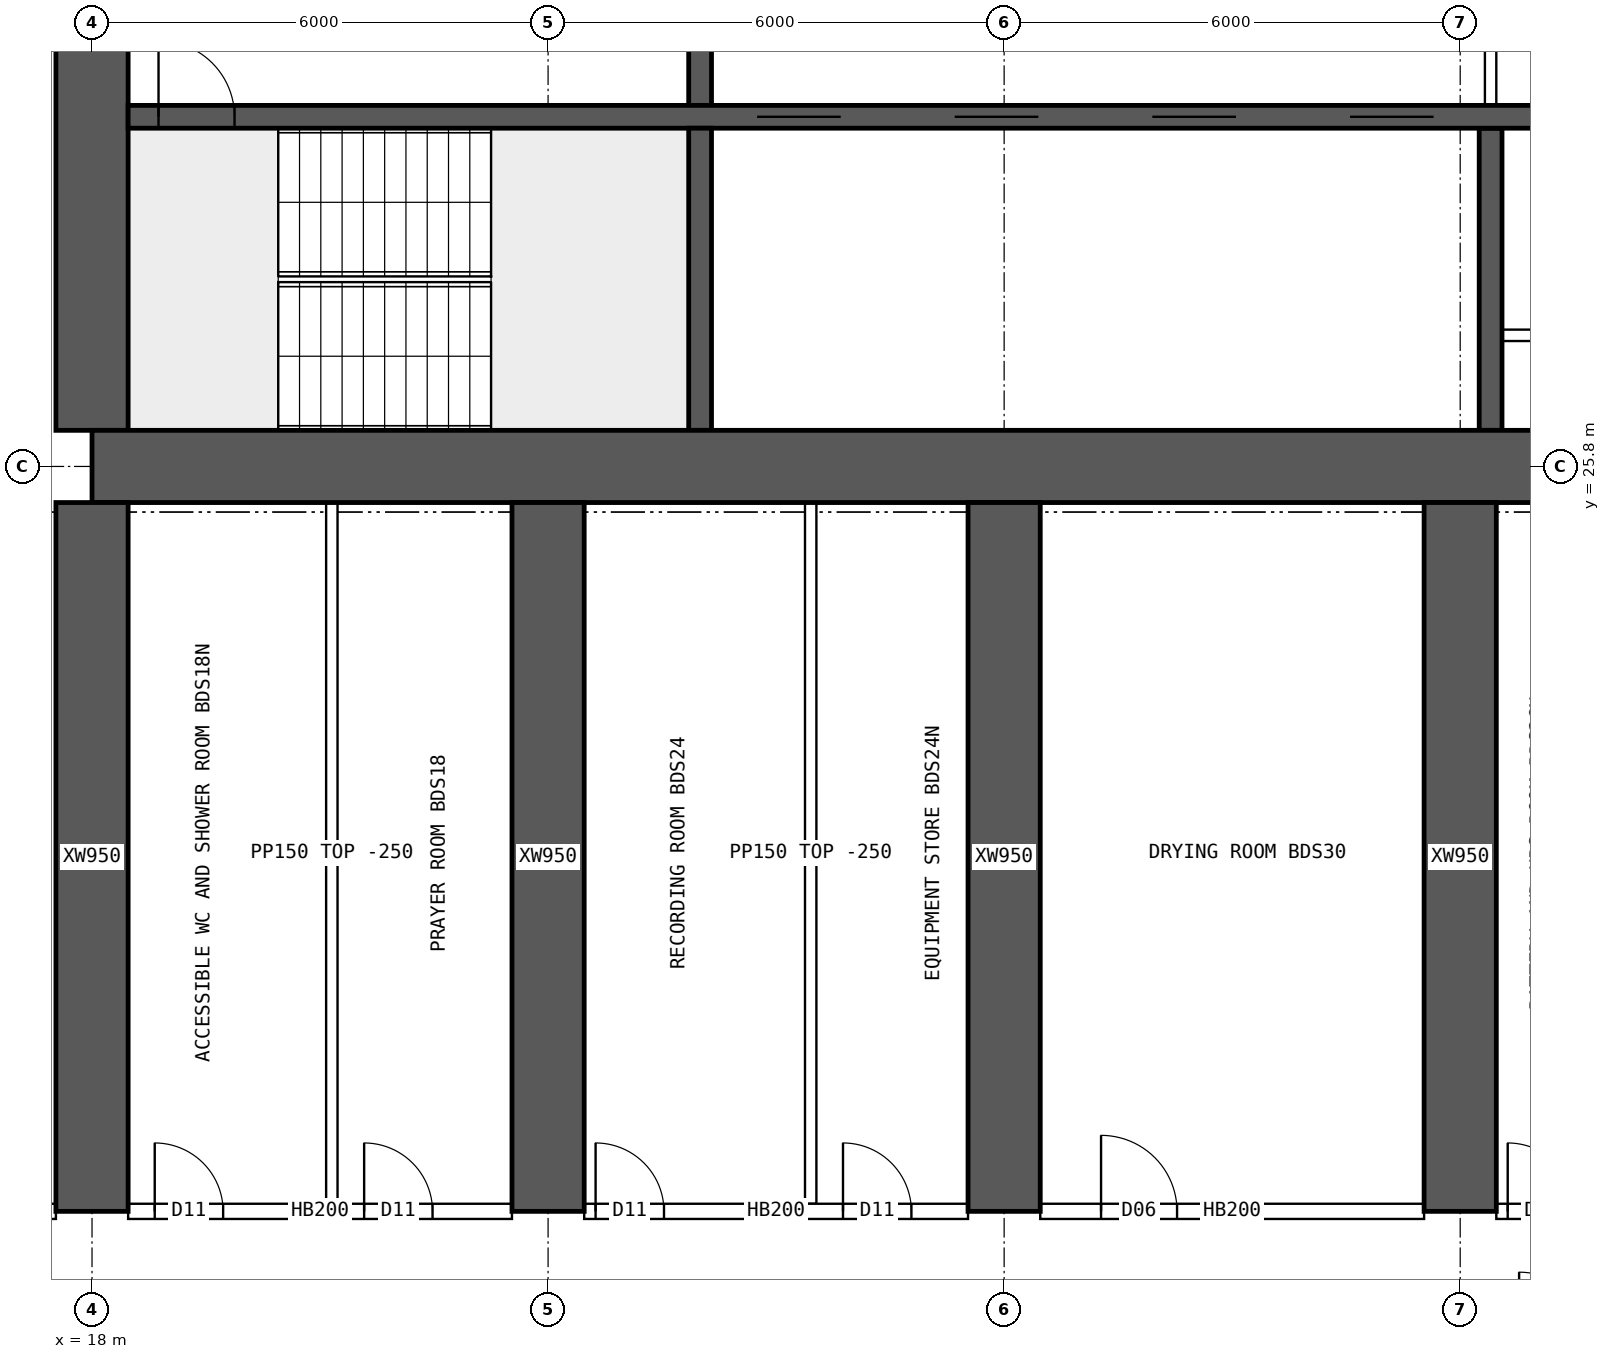
"""IFC4 building model, lengths in metres.
Left out: names, types, materials, properties, quantities, classifications, styles, units other than length and angle.
Written with IfcOpenShell. Run it as: python <this file> out.ifc"""

import sys

from ifc_helpers import new_model, si_unit, direction, frame, frame_2d, origin, place, context, subcontext, project, spatial, rectangle, extrude, element, fill, save


model = new_model("IFC4")
c1 = context("Model", 3, precision=1e-05, world=origin(), true_north=direction((0.0, 1.0)))
c2 = subcontext(c1, "Body", "Model", "MODEL_VIEW")
j1 = project(units=[si_unit("LENGTHUNIT", "METRE"), si_unit("PLANEANGLEUNIT", "RADIAN")], contexts=[c1])
p1 = place(None, origin())
s1 = spatial("IfcSite", under=j1, at=p1, CompositionType="ELEMENT")
p2 = place(p1, origin())
s2 = spatial("IfcBuilding", under=s1, at=p2, CompositionType="ELEMENT")
p3 = place(p2, frame((0.0, 0.0, 114.4)))
s3 = spatial("IfcBuildingStorey", under=s2, at=p3, CompositionType="ELEMENT", Elevation=114.4)
p4 = place(p3, frame((18.0, 25.8, 0.0), z_axis=(0.0, 0.0, 1.0), x_axis=(1.0, 0.0, 0.0)))
e1 = element("IfcWall", 1, at=p4, inside=s3, PredefinedType="SHEAR", context=c2, shape_type="SweptSolid", body=[
    extrude(rectangle(XDim=48.0, YDim=0.95, at=frame_2d((24.0, 0.0))), origin(), (0.0, 0.0, 1.0), 3.75),
])
p5 = place(p3, frame((18.0, 26.275, 0.0), z_axis=(0.0, 0.0, 1.0), x_axis=(0.0, 1.0, 0.0)))
e2 = element("IfcWall", 2, at=p5, inside=s3, PredefinedType="SHEAR", context=c2, shape_type="SweptSolid", body=[
    extrude(rectangle(XDim=11.45, YDim=0.95, at=frame_2d((5.725, 0.0))), origin(), (0.0, 0.0, 1.0), 3.75),
])
p6 = place(p5, frame((5.025, 0.0, 0.0)))
e3 = element("IfcOpeningElement", 3, at=p6, cuts=e2, PredefinedType="OPENING", context=c2, shape_type="SweptSolid", body=[
    extrude(rectangle(XDim=1.2, YDim=2.1, at=frame_2d((0.6, 1.05))), frame((0.0, 0.485, 0.0), z_axis=(0.0, -1.0, 0.0), x_axis=(1.0, 0.0, 0.0)), (0.0, 0.0, 1.0), 0.97),
])
p7 = place(p3, frame((18.475, 30.4, 0.0), z_axis=(0.0, 0.0, 1.0), x_axis=(1.0, 0.0, 0.0)))
e4 = element("IfcWall", 4, at=p7, inside=s3, PredefinedType="SHEAR", context=c2, shape_type="SweptSolid", body=[
    extrude(rectangle(XDim=47.05, YDim=0.3, at=frame_2d((23.525, 0.0))), origin(), (0.0, 0.0, 1.0), 3.75),
])
p8 = place(p7, frame((0.4, 0.0, 0.0)))
e5 = element("IfcOpeningElement", 5, at=p8, cuts=e4, PredefinedType="OPENING", context=c2, shape_type="SweptSolid", body=[
    extrude(rectangle(XDim=1.0, YDim=2.1, at=frame_2d((0.5, 1.05))), frame((0.0, 0.16, 0.0), z_axis=(0.0, -1.0, 0.0), x_axis=(1.0, 0.0, 0.0)), (0.0, 0.0, 1.0), 0.32),
])
p9 = place(p7, frame((45.65, 0.0, 0.0)))
e6 = element("IfcOpeningElement", 6, at=p9, cuts=e4, PredefinedType="OPENING", context=c2, shape_type="SweptSolid", body=[
    extrude(rectangle(XDim=1.0, YDim=2.1, at=frame_2d((0.5, 1.05))), frame((0.0, 0.16, 0.0), z_axis=(0.0, -1.0, 0.0), x_axis=(1.0, 0.0, 0.0)), (0.0, 0.0, 1.0), 0.32),
])
p10 = place(p7, frame((8.275, 0.0, 0.0)))
e7 = element("IfcOpeningElement", 7, at=p10, cuts=e4, PredefinedType="OPENING", context=c2, shape_type="SweptSolid", body=[
    extrude(rectangle(XDim=1.1, YDim=2.1, at=frame_2d((0.55, 1.05))), frame((0.0, 0.16, 0.0), z_axis=(0.0, -1.0, 0.0), x_axis=(1.0, 0.0, 0.0)), (0.0, 0.0, 1.0), 0.32),
])
p11 = place(p7, frame((10.875, 0.0, 0.0)))
e8 = element("IfcOpeningElement", 8, at=p11, cuts=e4, PredefinedType="OPENING", context=c2, shape_type="SweptSolid", body=[
    extrude(rectangle(XDim=1.1, YDim=2.1, at=frame_2d((0.55, 1.05))), frame((0.0, 0.16, 0.0), z_axis=(0.0, -1.0, 0.0), x_axis=(1.0, 0.0, 0.0)), (0.0, 0.0, 1.0), 0.32),
])
p12 = place(p7, frame((13.475, 0.0, 0.0)))
e9 = element("IfcOpeningElement", 9, at=p12, cuts=e4, PredefinedType="OPENING", context=c2, shape_type="SweptSolid", body=[
    extrude(rectangle(XDim=1.1, YDim=2.1, at=frame_2d((0.55, 1.05))), frame((0.0, 0.16, 0.0), z_axis=(0.0, -1.0, 0.0), x_axis=(1.0, 0.0, 0.0)), (0.0, 0.0, 1.0), 0.32),
])
p13 = place(p7, frame((16.075, 0.0, 0.0)))
e10 = element("IfcOpeningElement", 10, at=p13, cuts=e4, PredefinedType="OPENING", context=c2, shape_type="SweptSolid", body=[
    extrude(rectangle(XDim=1.1, YDim=2.1, at=frame_2d((0.55, 1.05))), frame((0.0, 0.16, 0.0), z_axis=(0.0, -1.0, 0.0), x_axis=(1.0, 0.0, 0.0)), (0.0, 0.0, 1.0), 0.32),
])
p14 = place(p7, frame((18.85, 0.0, 0.0)))
e11 = element("IfcOpeningElement", 11, at=p14, cuts=e4, PredefinedType="OPENING", context=c2, shape_type="SweptSolid", body=[
    extrude(rectangle(XDim=0.9, YDim=2.1, at=frame_2d((0.45, 1.05))), frame((0.0, 0.16, 0.0), z_axis=(0.0, -1.0, 0.0), x_axis=(1.0, 0.0, 0.0)), (0.0, 0.0, 1.0), 0.32),
])
p15 = place(p7, frame((30.142, 0.0, 0.0)))
e12 = element("IfcOpeningElement", 12, at=p15, cuts=e4, PredefinedType="OPENING", context=c2, shape_type="SweptSolid", body=[
    extrude(rectangle(XDim=1.1, YDim=2.1, at=frame_2d((0.55, 1.05))), frame((0.0, 0.16, 0.0), z_axis=(0.0, -1.0, 0.0), x_axis=(1.0, 0.0, 0.0)), (0.0, 0.0, 1.0), 0.32),
])
p16 = place(p7, frame((33.675, 0.0, 0.0)))
e13 = element("IfcOpeningElement", 13, at=p16, cuts=e4, PredefinedType="OPENING", context=c2, shape_type="SweptSolid", body=[
    extrude(rectangle(XDim=1.1, YDim=2.1, at=frame_2d((0.55, 1.05))), frame((0.0, 0.16, 0.0), z_axis=(0.0, -1.0, 0.0), x_axis=(1.0, 0.0, 0.0)), (0.0, 0.0, 1.0), 0.32),
])
p17 = place(p7, frame((37.208, 0.0, 0.0)))
e14 = element("IfcOpeningElement", 14, at=p17, cuts=e4, PredefinedType="OPENING", context=c2, shape_type="SweptSolid", body=[
    extrude(rectangle(XDim=1.1, YDim=2.1, at=frame_2d((0.55, 1.05))), frame((0.0, 0.16, 0.0), z_axis=(0.0, -1.0, 0.0), x_axis=(1.0, 0.0, 0.0)), (0.0, 0.0, 1.0), 0.32),
])
p18 = place(p3, frame((26.0, 26.275, 0.0), z_axis=(0.0, 0.0, 1.0), x_axis=(0.0, 1.0, 0.0)))
e15 = element("IfcWall", 15, at=p18, inside=s3, PredefinedType="SHEAR", context=c2, shape_type="SweptSolid", body=[
    extrude(rectangle(XDim=3.975, YDim=0.3, at=frame_2d((1.988, 0.0))), origin(), (0.0, 0.0, 1.0), 3.75),
])
p19 = place(p3, frame((26.0, 30.55, 0.0), z_axis=(0.0, 0.0, 1.0), x_axis=(0.0, 1.0, 0.0)))
e16 = element("IfcWall", 16, at=p19, inside=s3, PredefinedType="SHEAR", context=c2, shape_type="SweptSolid", body=[
    extrude(rectangle(XDim=3.9, YDim=0.3, at=frame_2d((1.95, 0.0))), origin(), (0.0, 0.0, 1.0), 3.75),
])
p20 = place(p19, frame((1.4, 0.0, 0.0)))
e17 = element("IfcOpeningElement", 17, at=p20, cuts=e16, PredefinedType="OPENING", context=c2, shape_type="SweptSolid", body=[
    extrude(rectangle(XDim=1.2, YDim=2.1, at=frame_2d((0.6, 1.05))), frame((0.0, 0.16, 0.0), z_axis=(0.0, -1.0, 0.0), x_axis=(1.0, 0.0, 0.0)), (0.0, 0.0, 1.0), 0.32),
])
p21 = place(p3, frame((36.4, 26.275, 0.0), z_axis=(0.0, 0.0, 1.0), x_axis=(0.0, 1.0, 0.0)))
e18 = element("IfcWall", 18, at=p21, inside=s3, PredefinedType="SHEAR", context=c2, shape_type="SweptSolid", body=[
    extrude(rectangle(XDim=3.975, YDim=0.3, at=frame_2d((1.988, 0.0))), origin(), (0.0, 0.0, 1.0), 3.75),
])
for number, where, z_axis, x_axis in (
    (19, (18.0, 16.0, 0.0), (0.0, 0.0, 1.0), (0.0, 1.0, 0.0)),
    (20, (24.0, 16.0, 0.0), (0.0, 0.0, 1.0), (0.0, 1.0, 0.0)),
    (21, (30.0, 16.0, 0.0), (0.0, 0.0, 1.0), (0.0, 1.0, 0.0)),
    (22, (36.0, 16.0, 0.0), (0.0, 0.0, 1.0), (0.0, 1.0, 0.0)),
):
    element("IfcWall", number, at=place(p3, frame(where, z_axis=z_axis, x_axis=x_axis)), inside=s3, PredefinedType="SHEAR", context=c2, shape_type="SweptSolid", body=[
        extrude(rectangle(XDim=9.325, YDim=0.95, at=frame_2d((4.663, 0.0))), origin(), (0.0, 0.0, 1.0), 3.75),
    ])
p22 = place(p3, frame((36.4, 30.55, 0.0), z_axis=(0.0, 0.0, 1.0), x_axis=(0.0, 1.0, 0.0)))
e23 = element("IfcWall", 23, at=p22, inside=s3, PredefinedType="SOLIDWALL", context=c2, shape_type="SweptSolid", body=[
    extrude(rectangle(XDim=3.9, YDim=0.15, at=frame_2d((1.95, 0.0))), origin(), (0.0, 0.0, 1.0), 3.5),
])
p23 = place(p22, frame((1.15, 0.0, 0.0)))
e24 = element("IfcOpeningElement", 24, at=p23, cuts=e23, PredefinedType="OPENING", context=c2, shape_type="SweptSolid", body=[
    extrude(rectangle(XDim=1.6, YDim=2.1, at=frame_2d((0.8, 1.05))), frame((0.0, 0.085, 0.0), z_axis=(0.0, -1.0, 0.0), x_axis=(1.0, 0.0, 0.0)), (0.0, 0.0, 1.0), 0.17),
])
p24 = place(p3, frame((36.55, 27.525, 0.0), z_axis=(0.0, 0.0, 1.0), x_axis=(1.0, 0.0, 0.0)))
e25 = element("IfcWall", 25, at=p24, inside=s3, PredefinedType="SOLIDWALL", context=c2, shape_type="SweptSolid", body=[
    extrude(rectangle(XDim=2.5, YDim=0.15, at=frame_2d((1.25, 0.0))), origin(), (0.0, 0.0, 1.0), 3.5),
])
p25 = place(p24, frame((0.8, 0.0, 0.0)))
e26 = element("IfcOpeningElement", 26, at=p25, cuts=e25, PredefinedType="OPENING", context=c2, shape_type="SweptSolid", body=[
    extrude(rectangle(XDim=0.9, YDim=2.1, at=frame_2d((0.45, 1.05))), frame((0.0, 0.085, 0.0), z_axis=(0.0, -1.0, 0.0), x_axis=(1.0, 0.0, 0.0)), (0.0, 0.0, 1.0), 0.17),
])
p26 = place(p3, frame((12.475, 16.0, 0.0), z_axis=(0.0, 0.0, 1.0), x_axis=(1.0, 0.0, 0.0)))
e27 = element("IfcWall", 27, at=p26, inside=s3, PredefinedType="SOLIDWALL", context=c2, shape_type="SweptSolid", body=[
    extrude(rectangle(XDim=5.05, YDim=0.2, at=frame_2d((2.525, 0.0))), origin(), (0.0, 0.0, 1.0), 3.5),
])
p27 = place(p26, frame((3.325, 0.0, 0.0)))
e28 = element("IfcOpeningElement", 28, at=p27, cuts=e27, PredefinedType="OPENING", context=c2, shape_type="SweptSolid", body=[
    extrude(rectangle(XDim=1.6, YDim=2.1, at=frame_2d((0.8, 1.05))), frame((0.0, 0.11, 0.0), z_axis=(0.0, -1.0, 0.0), x_axis=(1.0, 0.0, 0.0)), (0.0, 0.0, 1.0), 0.22),
])
p28 = place(p3, frame((18.475, 16.0, 0.0), z_axis=(0.0, 0.0, 1.0), x_axis=(1.0, 0.0, 0.0)))
e29 = element("IfcWall", 29, at=p28, inside=s3, PredefinedType="SOLIDWALL", context=c2, shape_type="SweptSolid", body=[
    extrude(rectangle(XDim=5.05, YDim=0.2, at=frame_2d((2.525, 0.0))), origin(), (0.0, 0.0, 1.0), 3.5),
])
p29 = place(p28, frame((0.35, 0.0, 0.0)))
e30 = element("IfcOpeningElement", 30, at=p29, cuts=e29, PredefinedType="OPENING", context=c2, shape_type="SweptSolid", body=[
    extrude(rectangle(XDim=0.9, YDim=2.1, at=frame_2d((0.45, 1.05))), frame((0.0, 0.11, 0.0), z_axis=(0.0, -1.0, 0.0), x_axis=(1.0, 0.0, 0.0)), (0.0, 0.0, 1.0), 0.22),
])
p30 = place(p28, frame((3.105, 0.0, 0.0)))
e31 = element("IfcOpeningElement", 31, at=p30, cuts=e29, PredefinedType="OPENING", context=c2, shape_type="SweptSolid", body=[
    extrude(rectangle(XDim=0.9, YDim=2.1, at=frame_2d((0.45, 1.05))), frame((0.0, 0.11, 0.0), z_axis=(0.0, -1.0, 0.0), x_axis=(1.0, 0.0, 0.0)), (0.0, 0.0, 1.0), 0.22),
])
p31 = place(p3, frame((24.475, 16.0, 0.0), z_axis=(0.0, 0.0, 1.0), x_axis=(1.0, 0.0, 0.0)))
e32 = element("IfcWall", 32, at=p31, inside=s3, PredefinedType="SOLIDWALL", context=c2, shape_type="SweptSolid", body=[
    extrude(rectangle(XDim=5.05, YDim=0.2, at=frame_2d((2.525, 0.0))), origin(), (0.0, 0.0, 1.0), 3.5),
])
p32 = place(p31, frame((0.15, 0.0, 0.0)))
e33 = element("IfcOpeningElement", 33, at=p32, cuts=e32, PredefinedType="OPENING", context=c2, shape_type="SweptSolid", body=[
    extrude(rectangle(XDim=0.9, YDim=2.1, at=frame_2d((0.45, 1.05))), frame((0.0, 0.11, 0.0), z_axis=(0.0, -1.0, 0.0), x_axis=(1.0, 0.0, 0.0)), (0.0, 0.0, 1.0), 0.22),
])
p33 = place(p31, frame((3.405, 0.0, 0.0)))
e34 = element("IfcOpeningElement", 34, at=p33, cuts=e32, PredefinedType="OPENING", context=c2, shape_type="SweptSolid", body=[
    extrude(rectangle(XDim=0.9, YDim=2.1, at=frame_2d((0.45, 1.05))), frame((0.0, 0.11, 0.0), z_axis=(0.0, -1.0, 0.0), x_axis=(1.0, 0.0, 0.0)), (0.0, 0.0, 1.0), 0.22),
])
p34 = place(p3, frame((30.475, 16.0, 0.0), z_axis=(0.0, 0.0, 1.0), x_axis=(1.0, 0.0, 0.0)))
e35 = element("IfcWall", 35, at=p34, inside=s3, PredefinedType="SOLIDWALL", context=c2, shape_type="SweptSolid", body=[
    extrude(rectangle(XDim=5.05, YDim=0.2, at=frame_2d((2.525, 0.0))), origin(), (0.0, 0.0, 1.0), 3.5),
])
p35 = place(p34, frame((0.8, 0.0, 0.0)))
e36 = element("IfcOpeningElement", 36, at=p35, cuts=e35, PredefinedType="OPENING", context=c2, shape_type="SweptSolid", body=[
    extrude(rectangle(XDim=1.0, YDim=2.1, at=frame_2d((0.5, 1.05))), frame((0.0, 0.11, 0.0), z_axis=(0.0, -1.0, 0.0), x_axis=(1.0, 0.0, 0.0)), (0.0, 0.0, 1.0), 0.22),
])
p36 = place(p3, frame((36.475, 16.0, 0.0), z_axis=(0.0, 0.0, 1.0), x_axis=(1.0, 0.0, 0.0)))
e37 = element("IfcWall", 37, at=p36, inside=s3, PredefinedType="SOLIDWALL", context=c2, shape_type="SweptSolid", body=[
    extrude(rectangle(XDim=5.05, YDim=0.2, at=frame_2d((2.525, 0.0))), origin(), (0.0, 0.0, 1.0), 3.5),
])
p37 = place(p36, frame((0.15, 0.0, 0.0)))
e38 = element("IfcOpeningElement", 38, at=p37, cuts=e37, PredefinedType="OPENING", context=c2, shape_type="SweptSolid", body=[
    extrude(rectangle(XDim=0.9, YDim=2.1, at=frame_2d((0.45, 1.05))), frame((0.0, 0.11, 0.0), z_axis=(0.0, -1.0, 0.0), x_axis=(1.0, 0.0, 0.0)), (0.0, 0.0, 1.0), 0.22),
])
p38 = place(p36, frame((2.615, 0.0, 0.0)))
e39 = element("IfcOpeningElement", 39, at=p38, cuts=e37, PredefinedType="OPENING", context=c2, shape_type="SweptSolid", body=[
    extrude(rectangle(XDim=0.9, YDim=2.1, at=frame_2d((0.45, 1.05))), frame((0.0, 0.11, 0.0), z_axis=(0.0, -1.0, 0.0), x_axis=(1.0, 0.0, 0.0)), (0.0, 0.0, 1.0), 0.22),
])
for number, where, z_axis, x_axis in (
    (40, (21.155, 16.1, 0.0), (0.0, 0.0, 1.0), (0.0, 1.0, 0.0)),
    (41, (27.455, 16.1, 0.0), (0.0, 0.0, 1.0), (0.0, 1.0, 0.0)),
):
    element("IfcWall", number, at=place(p3, frame(where, z_axis=z_axis, x_axis=x_axis)), inside=s3, PredefinedType="PARTITIONING", context=c2, shape_type="SweptSolid", body=[
        extrude(rectangle(XDim=9.225, YDim=0.15, at=frame_2d((4.612, 0.0))), origin(), (0.0, 0.0, 1.0), 3.5),
    ])
p39 = place(p8, origin())
e42 = element("IfcDoor", 42, at=p39, inside=s3, OperationType="SINGLE_SWING_LEFT", PredefinedType="DOOR", context=c2, shape_type="SweptSolid", body=[
    extrude(rectangle(XDim=1.0, YDim=2.1, at=frame_2d((0.5, 1.05))), frame((0.0, 0.025, 0.0), z_axis=(0.0, -1.0, 0.0), x_axis=(1.0, 0.0, 0.0)), (0.0, 0.0, 1.0), 0.05),
])
fill(e5, e42)
p40 = place(p10, origin())
e43 = element("IfcDoor", 43, at=p40, inside=s3, OperationType="DOUBLE_DOOR_SLIDING", PredefinedType="DOOR", context=c2, shape_type="SweptSolid", body=[
    extrude(rectangle(XDim=1.1, YDim=2.1, at=frame_2d((0.55, 1.05))), frame((0.0, 0.025, 0.0), z_axis=(0.0, -1.0, 0.0), x_axis=(1.0, 0.0, 0.0)), (0.0, 0.0, 1.0), 0.05),
])
fill(e7, e43)
p41 = place(p11, origin())
e44 = element("IfcDoor", 44, at=p41, inside=s3, OperationType="DOUBLE_DOOR_SLIDING", PredefinedType="DOOR", context=c2, shape_type="SweptSolid", body=[
    extrude(rectangle(XDim=1.1, YDim=2.1, at=frame_2d((0.55, 1.05))), frame((0.0, 0.025, 0.0), z_axis=(0.0, -1.0, 0.0), x_axis=(1.0, 0.0, 0.0)), (0.0, 0.0, 1.0), 0.05),
])
fill(e8, e44)
p42 = place(p12, origin())
e45 = element("IfcDoor", 45, at=p42, inside=s3, OperationType="DOUBLE_DOOR_SLIDING", PredefinedType="DOOR", context=c2, shape_type="SweptSolid", body=[
    extrude(rectangle(XDim=1.1, YDim=2.1, at=frame_2d((0.55, 1.05))), frame((0.0, 0.025, 0.0), z_axis=(0.0, -1.0, 0.0), x_axis=(1.0, 0.0, 0.0)), (0.0, 0.0, 1.0), 0.05),
])
fill(e9, e45)
p43 = place(p13, origin())
e46 = element("IfcDoor", 46, at=p43, inside=s3, OperationType="DOUBLE_DOOR_SLIDING", PredefinedType="DOOR", context=c2, shape_type="SweptSolid", body=[
    extrude(rectangle(XDim=1.1, YDim=2.1, at=frame_2d((0.55, 1.05))), frame((0.0, 0.025, 0.0), z_axis=(0.0, -1.0, 0.0), x_axis=(1.0, 0.0, 0.0)), (0.0, 0.0, 1.0), 0.05),
])
fill(e10, e46)
p44 = place(p29, origin())
e47 = element("IfcDoor", 47, at=p44, inside=s3, OperationType="SINGLE_SWING_LEFT", PredefinedType="DOOR", context=c2, shape_type="SweptSolid", body=[
    extrude(rectangle(XDim=0.9, YDim=2.1, at=frame_2d((0.45, 1.05))), frame((0.0, 0.025, 0.0), z_axis=(0.0, -1.0, 0.0), x_axis=(1.0, 0.0, 0.0)), (0.0, 0.0, 1.0), 0.05),
])
fill(e30, e47)
p45 = place(p30, origin())
e48 = element("IfcDoor", 48, at=p45, inside=s3, OperationType="SINGLE_SWING_LEFT", PredefinedType="DOOR", context=c2, shape_type="SweptSolid", body=[
    extrude(rectangle(XDim=0.9, YDim=2.1, at=frame_2d((0.45, 1.05))), frame((0.0, 0.025, 0.0), z_axis=(0.0, -1.0, 0.0), x_axis=(1.0, 0.0, 0.0)), (0.0, 0.0, 1.0), 0.05),
])
fill(e31, e48)
p46 = place(p32, origin())
e49 = element("IfcDoor", 49, at=p46, inside=s3, OperationType="SINGLE_SWING_LEFT", PredefinedType="DOOR", context=c2, shape_type="SweptSolid", body=[
    extrude(rectangle(XDim=0.9, YDim=2.1, at=frame_2d((0.45, 1.05))), frame((0.0, 0.025, 0.0), z_axis=(0.0, -1.0, 0.0), x_axis=(1.0, 0.0, 0.0)), (0.0, 0.0, 1.0), 0.05),
])
fill(e33, e49)
p47 = place(p33, origin())
e50 = element("IfcDoor", 50, at=p47, inside=s3, OperationType="SINGLE_SWING_LEFT", PredefinedType="DOOR", context=c2, shape_type="SweptSolid", body=[
    extrude(rectangle(XDim=0.9, YDim=2.1, at=frame_2d((0.45, 1.05))), frame((0.0, 0.025, 0.0), z_axis=(0.0, -1.0, 0.0), x_axis=(1.0, 0.0, 0.0)), (0.0, 0.0, 1.0), 0.05),
])
fill(e34, e50)
p48 = place(p35, origin())
e51 = element("IfcDoor", 51, at=p48, inside=s3, OperationType="SINGLE_SWING_LEFT", PredefinedType="DOOR", context=c2, shape_type="SweptSolid", body=[
    extrude(rectangle(XDim=1.0, YDim=2.1, at=frame_2d((0.5, 1.05))), frame((0.0, 0.025, 0.0), z_axis=(0.0, -1.0, 0.0), x_axis=(1.0, 0.0, 0.0)), (0.0, 0.0, 1.0), 0.05),
])
fill(e36, e51)
p49 = place(p37, origin())
e52 = element("IfcDoor", 52, at=p49, inside=s3, OperationType="SINGLE_SWING_LEFT", PredefinedType="DOOR", context=c2, shape_type="SweptSolid", body=[
    extrude(rectangle(XDim=0.9, YDim=2.1, at=frame_2d((0.45, 1.05))), frame((0.0, 0.025, 0.0), z_axis=(0.0, -1.0, 0.0), x_axis=(1.0, 0.0, 0.0)), (0.0, 0.0, 1.0), 0.05),
])
fill(e38, e52)
save(model, sys.argv[1])
